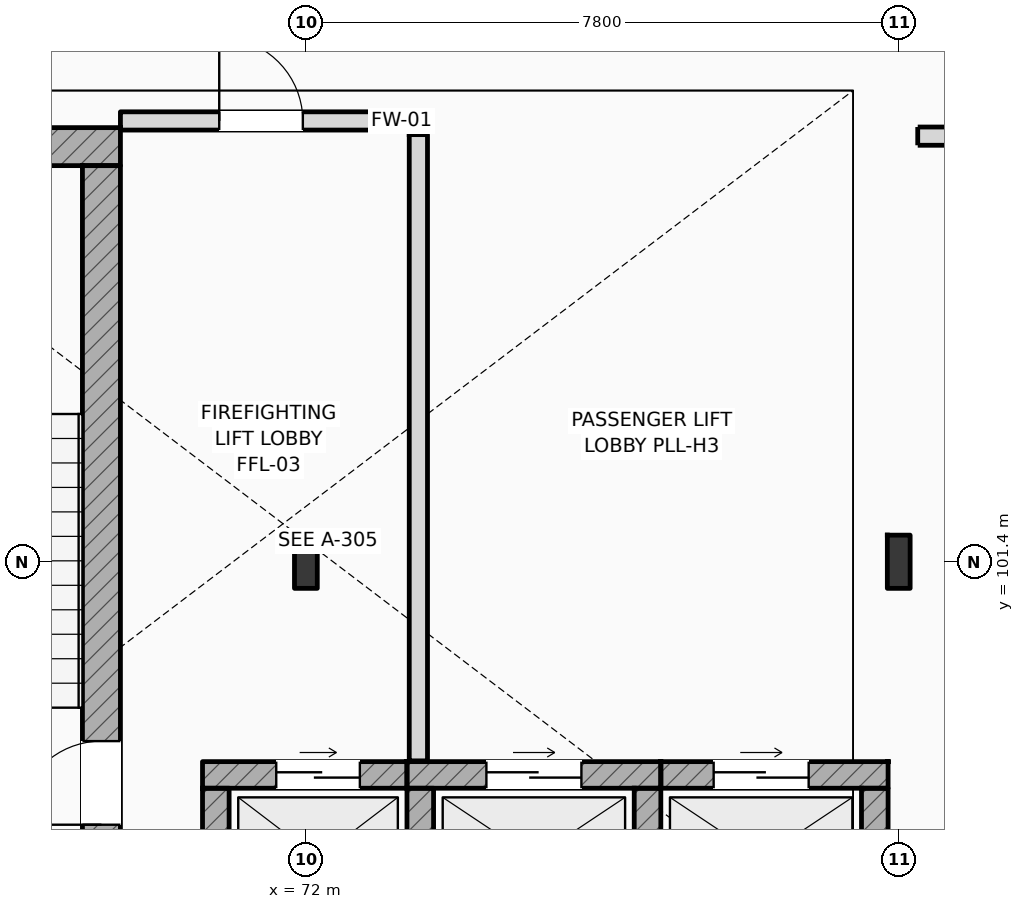
"""IFC4 building model, lengths in metres.
Left out: names, types, materials, properties, quantities, classifications, styles, units other than length and angle.
Written with IfcOpenShell. Run it as: python <this file> out.ifc"""

import sys

from ifc_helpers import new_model, si_unit, direction, frame, frame_2d, origin, origin_2d, place, context, subcontext, project, spatial, rectangle, i_section, extrude, element, fill, save


model = new_model("IFC4")
c1 = context("Model", 3, precision=1e-05, world=origin(), true_north=direction((0.0, 1.0)))
c2 = subcontext(c1, "Body", "Model", "MODEL_VIEW")
j1 = project(units=[si_unit("LENGTHUNIT", "METRE"), si_unit("PLANEANGLEUNIT", "RADIAN")], contexts=[c1])
p1 = place(None, origin())
s1 = spatial("IfcSite", under=j1, at=p1, CompositionType="ELEMENT")
p2 = place(p1, origin())
s2 = spatial("IfcBuilding", under=s1, at=p2, CompositionType="ELEMENT")
p3 = place(p2, frame((0.0, 0.0, -4.5)))
s3 = spatial("IfcBuildingStorey", under=s2, at=p3, CompositionType="ELEMENT", Elevation=-4.5)
for number, where, z_axis, x_axis in (
    (1, (72.0, 101.4, 0.0), (0.0, 0.0, 1.0), (1.0, 0.0, 0.0)),
    (2, (79.8, 101.4, 0.0), (0.0, 0.0, 1.0), (1.0, 0.0, 0.0)),
):
    element("IfcColumn", number, at=place(p3, frame(where, z_axis=z_axis, x_axis=x_axis)), inside=s3, PredefinedType="COLUMN", context=c2, shape_type="SweptSolid", body=[
        extrude(i_section(OverallWidth=0.3, OverallDepth=0.7, WebThickness=0.017, FlangeThickness=0.032, FilletRadius=0.027, at=origin_2d()), origin(), (0.0, 0.0, 1.0), 4.5),
    ])
p4 = place(p3, frame((64.4, 106.862, 0.0), z_axis=(0.0, 0.0, 1.0), x_axis=(1.0, 0.0, 0.0)))
e3 = element("IfcWall", 3, at=p4, inside=s3, PredefinedType="SHEAR", context=c2, shape_type="SweptSolid", body=[
    extrude(rectangle(XDim=5.16, YDim=0.5, at=frame_2d((2.58, 0.0))), origin(), (0.0, 0.0, 1.0), 4.5),
])
p5 = place(p3, frame((69.31, 97.5, 0.0), z_axis=(0.0, 0.0, 1.0), x_axis=(0.0, 1.0, 0.0)))
e4 = element("IfcWall", 4, at=p5, inside=s3, PredefinedType="SHEAR", context=c2, shape_type="SweptSolid", body=[
    extrude(rectangle(XDim=9.112, YDim=0.5, at=frame_2d((4.556, 0.0))), origin(), (0.0, 0.0, 1.0), 4.5),
])
p6 = place(p5, frame((0.44, 0.0, 0.0)))
e5 = element("IfcOpeningElement", 5, at=p6, cuts=e4, PredefinedType="OPENING", context=c2, shape_type="SweptSolid", body=[
    extrude(rectangle(XDim=1.1, YDim=2.2, at=frame_2d((0.55, 1.1))), frame((0.0, 0.26, 0.0), z_axis=(0.0, -1.0, 0.0), x_axis=(1.0, 0.0, 0.0)), (0.0, 0.0, 1.0), 0.52),
])
p7 = place(p3, frame((70.64, 98.595, 0.0), z_axis=(0.0, 0.0, 1.0), x_axis=(1.0, 0.0, 0.0)))
e6 = element("IfcWall", 6, at=p7, inside=s3, PredefinedType="SHEAR", context=c2, shape_type="SweptSolid", body=[
    extrude(rectangle(XDim=2.69, YDim=0.35, at=frame_2d((1.345, 0.0))), origin(), (0.0, 0.0, 1.0), 4.1),
])
p8 = place(p7, frame((0.97, 0.0, 0.0)))
e7 = element("IfcOpeningElement", 7, at=p8, cuts=e6, PredefinedType="OPENING", context=c2, shape_type="SweptSolid", body=[
    extrude(rectangle(XDim=1.1, YDim=2.2, at=frame_2d((0.55, 1.1))), frame((0.0, 0.185, 0.0), z_axis=(0.0, -1.0, 0.0), x_axis=(1.0, 0.0, 0.0)), (0.0, 0.0, 1.0), 0.37),
])
p9 = place(p3, frame((70.815, 96.58, 0.0), z_axis=(0.0, 0.0, 1.0), x_axis=(0.0, 1.0, 0.0)))
e8 = element("IfcWall", 8, at=p9, inside=s3, PredefinedType="SHEAR", context=c2, shape_type="SweptSolid", body=[
    extrude(rectangle(XDim=1.84, YDim=0.35, at=frame_2d((0.92, 0.0))), origin(), (0.0, 0.0, 1.0), 4.1),
])
p10 = place(p3, frame((73.33, 98.595, 0.0), z_axis=(0.0, 0.0, 1.0), x_axis=(1.0, 0.0, 0.0)))
e9 = element("IfcWall", 9, at=p10, inside=s3, PredefinedType="SHEAR", context=c2, shape_type="SweptSolid", body=[
    extrude(rectangle(XDim=3.34, YDim=0.35, at=frame_2d((1.67, 0.0))), origin(), (0.0, 0.0, 1.0), 4.1),
])
p11 = place(p10, frame((1.045, 0.0, 0.0)))
e10 = element("IfcOpeningElement", 10, at=p11, cuts=e9, PredefinedType="OPENING", context=c2, shape_type="SweptSolid", body=[
    extrude(rectangle(XDim=1.25, YDim=2.25, at=frame_2d((0.625, 1.125))), frame((0.0, 0.185, 0.0), z_axis=(0.0, -1.0, 0.0), x_axis=(1.0, 0.0, 0.0)), (0.0, 0.0, 1.0), 0.37),
])
for number, where, z_axis, x_axis in (
    (11, (73.505, 96.58, 0.0), (0.0, 0.0, 1.0), (0.0, 1.0, 0.0)),
    (12, (76.495, 96.58, 0.0), (0.0, 0.0, 1.0), (0.0, 1.0, 0.0)),
):
    element("IfcWall", number, at=place(p3, frame(where, z_axis=z_axis, x_axis=x_axis)), inside=s3, PredefinedType="SHEAR", context=c2, shape_type="SweptSolid", body=[
        extrude(rectangle(XDim=1.84, YDim=0.35, at=frame_2d((0.92, 0.0))), origin(), (0.0, 0.0, 1.0), 4.1),
    ])
p12 = place(p3, frame((76.67, 98.595, 0.0), z_axis=(0.0, 0.0, 1.0), x_axis=(1.0, 0.0, 0.0)))
e13 = element("IfcWall", 13, at=p12, inside=s3, PredefinedType="SHEAR", context=c2, shape_type="SweptSolid", body=[
    extrude(rectangle(XDim=2.99, YDim=0.35, at=frame_2d((1.495, 0.0))), origin(), (0.0, 0.0, 1.0), 4.1),
])
p13 = place(p12, frame((0.695, 0.0, 0.0)))
e14 = element("IfcOpeningElement", 14, at=p13, cuts=e13, PredefinedType="OPENING", context=c2, shape_type="SweptSolid", body=[
    extrude(rectangle(XDim=1.25, YDim=2.25, at=frame_2d((0.625, 1.125))), frame((0.0, 0.185, 0.0), z_axis=(0.0, -1.0, 0.0), x_axis=(1.0, 0.0, 0.0)), (0.0, 0.0, 1.0), 0.37),
])
p14 = place(p3, frame((79.485, 96.58, 0.0), z_axis=(0.0, 0.0, 1.0), x_axis=(0.0, 1.0, 0.0)))
e15 = element("IfcWall", 15, at=p14, inside=s3, PredefinedType="SHEAR", context=c2, shape_type="SweptSolid", body=[
    extrude(rectangle(XDim=1.84, YDim=0.35, at=frame_2d((0.92, 0.0))), origin(), (0.0, 0.0, 1.0), 3.64),
])
p15 = place(p3, frame((73.48, 98.78, 0.0), z_axis=(0.0, 0.0, 1.0), x_axis=(0.0, 1.0, 0.0)))
e16 = element("IfcWall", 16, at=p15, inside=s3, PredefinedType="STANDARD", context=c2, shape_type="SweptSolid", body=[
    extrude(rectangle(XDim=8.24, YDim=0.24, at=frame_2d((4.12, 0.0))), origin(), (0.0, 0.0, 1.0), 4.1),
])
p16 = place(p3, frame((69.56, 107.2, 0.0), z_axis=(0.0, 0.0, 1.0), x_axis=(1.0, 0.0, 0.0)))
e17 = element("IfcWall", 17, at=p16, inside=s3, PredefinedType="STANDARD", context=c2, shape_type="SweptSolid", body=[
    extrude(rectangle(XDim=4.1, YDim=0.24, at=frame_2d((2.05, 0.0))), origin(), (0.0, 0.0, 1.0), 4.1),
])
p17 = place(p16, frame((1.3, 0.0, 0.0)))
e18 = element("IfcOpeningElement", 18, at=p17, cuts=e17, PredefinedType="OPENING", context=c2, shape_type="SweptSolid", body=[
    extrude(rectangle(XDim=1.1, YDim=2.2, at=frame_2d((0.55, 1.1))), frame((0.0, 0.13, 0.0), z_axis=(0.0, -1.0, 0.0), x_axis=(1.0, 0.0, 0.0)), (0.0, 0.0, 1.0), 0.26),
])
p18 = place(p3, frame((80.05, 107.0, 0.0), z_axis=(0.0, 0.0, 1.0), x_axis=(1.0, 0.0, 0.0)))
e19 = element("IfcWall", 19, at=p18, inside=s3, PredefinedType="STANDARD", context=c2, shape_type="SweptSolid", body=[
    extrude(rectangle(XDim=39.05, YDim=0.24, at=frame_2d((19.525, 0.0))), origin(), (0.0, 0.0, 1.0), 4.1),
])
p19 = place(p18, frame((18.975, 0.0, 0.0)))
e20 = element("IfcOpeningElement", 20, at=p19, cuts=e19, PredefinedType="OPENING", context=c2, shape_type="SweptSolid", body=[
    extrude(rectangle(XDim=1.1, YDim=2.2, at=frame_2d((0.55, 1.1))), frame((0.0, 0.13, 0.0), z_axis=(0.0, -1.0, 0.0), x_axis=(1.0, 0.0, 0.0)), (0.0, 0.0, 1.0), 0.26),
])
p20 = place(p6, origin())
e21 = element("IfcDoor", 21, at=p20, inside=s3, OperationType="SINGLE_SWING_LEFT", PredefinedType="DOOR", context=c2, shape_type="SweptSolid", body=[
    extrude(rectangle(XDim=1.1, YDim=2.2, at=frame_2d((0.55, 1.1))), frame((0.0, 0.025, 0.0), z_axis=(0.0, -1.0, 0.0), x_axis=(1.0, 0.0, 0.0)), (0.0, 0.0, 1.0), 0.05),
])
fill(e5, e21)
p21 = place(p8, origin())
e22 = element("IfcDoor", 22, at=p21, inside=s3, OperationType="SLIDING_TO_LEFT", PredefinedType="DOOR", context=c2, shape_type="SweptSolid", body=[
    extrude(rectangle(XDim=1.1, YDim=2.2, at=frame_2d((0.55, 1.1))), frame((0.0, 0.025, 0.0), z_axis=(0.0, -1.0, 0.0), x_axis=(1.0, 0.0, 0.0)), (0.0, 0.0, 1.0), 0.05),
])
fill(e7, e22)
p22 = place(p11, origin())
e23 = element("IfcDoor", 23, at=p22, inside=s3, OperationType="SLIDING_TO_LEFT", PredefinedType="DOOR", context=c2, shape_type="SweptSolid", body=[
    extrude(rectangle(XDim=1.25, YDim=2.25, at=frame_2d((0.625, 1.125))), frame((0.0, 0.025, 0.0), z_axis=(0.0, -1.0, 0.0), x_axis=(1.0, 0.0, 0.0)), (0.0, 0.0, 1.0), 0.05),
])
fill(e10, e23)
p23 = place(p13, origin())
e24 = element("IfcDoor", 24, at=p23, inside=s3, OperationType="SLIDING_TO_LEFT", PredefinedType="DOOR", context=c2, shape_type="SweptSolid", body=[
    extrude(rectangle(XDim=1.25, YDim=2.25, at=frame_2d((0.625, 1.125))), frame((0.0, 0.025, 0.0), z_axis=(0.0, -1.0, 0.0), x_axis=(1.0, 0.0, 0.0)), (0.0, 0.0, 1.0), 0.05),
])
fill(e14, e24)
p24 = place(p17, origin())
e25 = element("IfcDoor", 25, at=p24, inside=s3, OperationType="SINGLE_SWING_LEFT", PredefinedType="DOOR", context=c2, shape_type="SweptSolid", body=[
    extrude(rectangle(XDim=1.1, YDim=2.2, at=frame_2d((0.55, 1.1))), frame((0.0, 0.025, 0.0), z_axis=(0.0, -1.0, 0.0), x_axis=(1.0, 0.0, 0.0)), (0.0, 0.0, 1.0), 0.05),
])
fill(e18, e25)
save(model, sys.argv[1])
